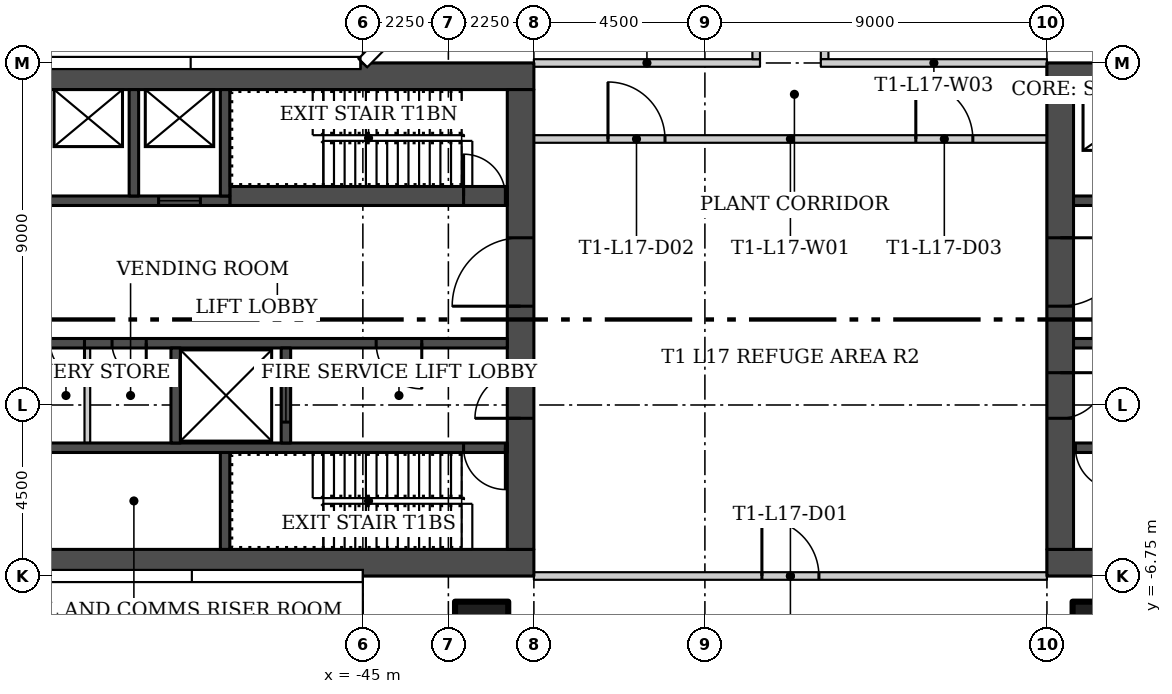
"""IFC4 building model, lengths in metres.
Left out: names, types, materials, properties, quantities, classifications, styles, units other than length and angle.
Written with IfcOpenShell. Run it as: python <this file> out.ifc"""

import sys

from ifc_helpers import new_model, si_unit, direction, frame, frame_2d, origin, origin_2d, place, context, subcontext, project, spatial, rectangle, hollow_rectangle, extrude, element, fill, save


model = new_model("IFC4")
c1 = context("Model", 3, precision=1e-05, world=origin(), true_north=direction((0.0, 1.0)))
c2 = subcontext(c1, "Body", "Model", "MODEL_VIEW")
j1 = project(units=[si_unit("LENGTHUNIT", "METRE"), si_unit("PLANEANGLEUNIT", "RADIAN")], contexts=[c1])
p1 = place(None, origin())
s1 = spatial("IfcSite", under=j1, at=p1, CompositionType="ELEMENT")
p2 = place(p1, origin())
s2 = spatial("IfcBuilding", under=s1, at=p2, CompositionType="ELEMENT")
p3 = place(p2, frame((0.0, 0.0, 77.1)))
s3 = spatial("IfcBuildingStorey", under=s2, at=p3, CompositionType="ELEMENT", Elevation=77.1)
for number, where in (
    (1, (-25.625, -8.125, 0.0)),
    (2, (-41.875, -8.125, 0.0)),
):
    element("IfcColumn", number, at=place(p3, frame(where)), inside=s3, PredefinedType="COLUMN", context=c2, shape_type="SweptSolid", body=[
        extrude(hollow_rectangle(XDim=1.4, YDim=1.4, WallThickness=0.05, at=origin_2d()), origin(), (0.0, 0.0, 1.0), 4.45),
    ])
p4 = place(p3, frame((-40.5, 4.75, 0.0)))
e3 = element("IfcWall", 3, at=p4, inside=s3, PredefinedType="PARTITIONING", context=c2, shape_type="SweptSolid", body=[
    extrude(rectangle(XDim=13.5, YDim=0.2, at=frame_2d((6.75, 0.0))), origin(), (0.0, 0.0, 1.0), 4.45),
])
p5 = place(p4, frame((1.95, 0.0, 0.0)))
e4 = element("IfcOpeningElement", 4, at=p5, cuts=e3, PredefinedType="OPENING", context=c2, shape_type="SweptSolid", body=[
    extrude(rectangle(XDim=1.5, YDim=2.4, at=frame_2d((0.75, 1.2))), frame((0.0, 0.11, 0.0), z_axis=(0.0, -1.0, 0.0), x_axis=(1.0, 0.0, 0.0)), (0.0, 0.0, 1.0), 0.22),
])
p6 = place(p4, frame((10.05, 0.0, 0.0)))
e5 = element("IfcOpeningElement", 5, at=p6, cuts=e3, PredefinedType="OPENING", context=c2, shape_type="SweptSolid", body=[
    extrude(rectangle(XDim=1.5, YDim=2.4, at=frame_2d((0.75, 1.2))), frame((0.0, 0.11, 0.0), z_axis=(0.0, -1.0, 0.0), x_axis=(1.0, 0.0, 0.0)), (0.0, 0.0, 1.0), 0.22),
])
p7 = place(p3, frame((-32.85, 15.65, 0.0), z_axis=(0.0, 0.0, 1.0), x_axis=(0.0, -1.0, 0.0)))
e6 = element("IfcWall", 6, at=p7, inside=s3, PredefinedType="PARTITIONING", context=c2, shape_type="SweptSolid", body=[
    extrude(rectangle(XDim=8.8, YDim=0.2, at=frame_2d((4.4, 0.0))), origin(), (0.0, 0.0, 1.0), 4.45),
])
p8 = place(p7, frame((3.65, 0.0, 0.0)))
e7 = element("IfcOpeningElement", 7, at=p8, cuts=e6, PredefinedType="OPENING", context=c2, shape_type="SweptSolid", body=[
    extrude(rectangle(XDim=1.5, YDim=2.4, at=frame_2d((0.75, 1.2))), frame((0.0, 0.11, 0.0), z_axis=(0.0, -1.0, 0.0), x_axis=(1.0, 0.0, 0.0)), (0.0, 0.0, 1.0), 0.22),
])
for number, where in (
    (8, (-32.95, 6.75, 0.0)),
    (9, (-40.5, 6.75, 0.0)),
):
    element("IfcWall", number, at=place(p3, frame(where)), inside=s3, PredefinedType="PARTITIONING", context=c2, shape_type="SweptSolid", body=[
        extrude(rectangle(XDim=5.95, YDim=0.2, at=frame_2d((2.975, 0.0))), origin(), (0.0, 0.0, 1.0), 4.45),
    ])
p9 = place(p3, frame((-34.65, 6.85, 0.0), z_axis=(0.0, 0.0, 1.0), x_axis=(0.0, 1.0, 0.0)))
e10 = element("IfcWall", 10, at=p9, inside=s3, PredefinedType="PARTITIONING", context=c2, shape_type="SweptSolid", body=[
    extrude(rectangle(XDim=8.8, YDim=0.2, at=frame_2d((4.4, 0.0))), origin(), (0.0, 0.0, 1.0), 4.45),
])
p10 = place(p9, frame((3.95, 0.0, 0.0)))
e11 = element("IfcOpeningElement", 11, at=p10, cuts=e10, PredefinedType="OPENING", context=c2, shape_type="SweptSolid", body=[
    extrude(rectangle(XDim=0.9, YDim=2.1, at=frame_2d((0.45, 1.05))), frame((0.0, 0.11, 0.0), z_axis=(0.0, -1.0, 0.0), x_axis=(1.0, 0.0, 0.0)), (0.0, 0.0, 1.0), 0.22),
])
p11 = place(p3, frame((-40.5, -6.75, 0.0)))
e12 = element("IfcWall", 12, at=p11, inside=s3, PredefinedType="PARTITIONING", context=c2, shape_type="SweptSolid", body=[
    extrude(rectangle(XDim=13.5, YDim=0.2, at=frame_2d((6.75, 0.0))), origin(), (0.0, 0.0, 1.0), 4.45),
])
p12 = place(p11, frame((6.0, 0.0, 0.0)))
e13 = element("IfcOpeningElement", 13, at=p12, cuts=e12, PredefinedType="OPENING", context=c2, shape_type="SweptSolid", body=[
    extrude(rectangle(XDim=1.5, YDim=2.4, at=frame_2d((0.75, 1.2))), frame((0.0, 0.11, 0.0), z_axis=(0.0, -1.0, 0.0), x_axis=(1.0, 0.0, 0.0)), (0.0, 0.0, 1.0), 0.22),
])
for number, where in (
    (14, (-27.0, -6.4, 0.0)),
    (15, (-27.0, 6.4, 0.0)),
):
    element("IfcWall", number, at=place(p3, frame(where)), inside=s3, PredefinedType="SHEAR", context=c2, shape_type="SweptSolid", body=[
        extrude(rectangle(XDim=13.5, YDim=0.7, at=frame_2d((6.75, 0.0))), origin(), (0.0, 0.0, 1.0), 4.45),
    ])
p13 = place(p3, frame((-26.65, 6.05, 0.0), z_axis=(0.0, 0.0, 1.0), x_axis=(0.0, -1.0, 0.0)))
e16 = element("IfcWall", 16, at=p13, inside=s3, PredefinedType="SHEAR", context=c2, shape_type="SweptSolid", body=[
    extrude(rectangle(XDim=12.1, YDim=0.7, at=frame_2d((6.05, 0.0))), origin(), (0.0, 0.0, 1.0), 4.45),
])
p14 = place(p13, frame((7.45, 0.0, 0.0)))
e17 = element("IfcOpeningElement", 17, at=p14, cuts=e16, PredefinedType="OPENING", context=c2, shape_type="SweptSolid", body=[
    extrude(rectangle(XDim=1.2, YDim=2.1, at=frame_2d((0.6, 1.05))), frame((0.0, 0.36, 0.0), z_axis=(0.0, -1.0, 0.0), x_axis=(1.0, 0.0, 0.0)), (0.0, 0.0, 1.0), 0.72),
])
p15 = place(p13, frame((3.9, 0.0, 0.0)))
e18 = element("IfcOpeningElement", 18, at=p15, cuts=e16, PredefinedType="OPENING", context=c2, shape_type="SweptSolid", body=[
    extrude(rectangle(XDim=1.8, YDim=2.4, at=frame_2d((0.9, 1.2))), frame((0.0, 0.36, 0.0), z_axis=(0.0, -1.0, 0.0), x_axis=(1.0, 0.0, 0.0)), (0.0, 0.0, 1.0), 0.72),
])
p16 = place(p3, frame((-14.2, -3.375, 0.0), z_axis=(0.0, 0.0, 1.0), x_axis=(-1.0, 0.0, 0.0)))
e19 = element("IfcWall", 19, at=p16, inside=s3, PredefinedType="SHEAR", context=c2, shape_type="SweptSolid", body=[
    extrude(rectangle(XDim=12.1, YDim=0.25, at=frame_2d((6.05, 0.0))), origin(), (0.0, 0.0, 1.0), 4.45),
])
p17 = place(p16, frame((10.95, 0.0, 0.0)))
e20 = element("IfcOpeningElement", 20, at=p17, cuts=e19, PredefinedType="OPENING", context=c2, shape_type="SweptSolid", body=[
    extrude(rectangle(XDim=1.1, YDim=2.1, at=frame_2d((0.55, 1.05))), frame((0.0, 0.135, 0.0), z_axis=(0.0, -1.0, 0.0), x_axis=(1.0, 0.0, 0.0)), (0.0, 0.0, 1.0), 0.27),
])
p18 = place(p3, frame((-14.2, -0.625, 0.0), z_axis=(0.0, 0.0, 1.0), x_axis=(-1.0, 0.0, 0.0)))
e21 = element("IfcWall", 21, at=p18, inside=s3, PredefinedType="SHEAR", context=c2, shape_type="SweptSolid", body=[
    extrude(rectangle(XDim=12.1, YDim=0.25, at=frame_2d((6.05, 0.0))), origin(), (0.0, 0.0, 1.0), 4.45),
])
p19 = place(p18, frame((8.65, 0.0, 0.0)))
e22 = element("IfcOpeningElement", 22, at=p19, cuts=e21, PredefinedType="OPENING", context=c2, shape_type="SweptSolid", body=[
    extrude(rectangle(XDim=1.2, YDim=2.1, at=frame_2d((0.6, 1.05))), frame((0.0, 0.135, 0.0), z_axis=(0.0, -1.0, 0.0), x_axis=(1.0, 0.0, 0.0)), (0.0, 0.0, 1.0), 0.27),
])
p20 = place(p18, frame((1.175, 0.0, 0.0)))
e23 = element("IfcOpeningElement", 23, at=p20, cuts=e21, PredefinedType="OPENING", context=c2, shape_type="SweptSolid", body=[
    extrude(rectangle(XDim=0.9, YDim=2.1, at=frame_2d((0.45, 1.05))), frame((0.0, 0.135, 0.0), z_axis=(0.0, -1.0, 0.0), x_axis=(1.0, 0.0, 0.0)), (0.0, 0.0, 1.0), 0.27),
])
p21 = place(p3, frame((-26.3, 3.125, 0.0)))
e24 = element("IfcWall", 24, at=p21, inside=s3, PredefinedType="SHEAR", context=c2, shape_type="SweptSolid", body=[
    extrude(rectangle(XDim=12.1, YDim=0.25, at=frame_2d((6.05, 0.0))), origin(), (0.0, 0.0, 1.0), 4.45),
])
p22 = place(p21, frame((0.85, 0.0, 0.0)))
e25 = element("IfcOpeningElement", 25, at=p22, cuts=e24, PredefinedType="OPENING", context=c2, shape_type="SweptSolid", body=[
    extrude(rectangle(XDim=1.1, YDim=2.1, at=frame_2d((0.55, 1.05))), frame((0.0, 0.135, 0.0), z_axis=(0.0, -1.0, 0.0), x_axis=(1.0, 0.0, 0.0)), (0.0, 0.0, 1.0), 0.27),
])
p23 = place(p21, frame((3.9, 0.0, 0.0)))
e26 = element("IfcOpeningElement", 26, at=p23, cuts=e24, PredefinedType="OPENING", context=c2, shape_type="SweptSolid", body=[
    extrude(rectangle(XDim=1.1, YDim=2.1, at=frame_2d((0.55, 1.05))), frame((0.0, 0.135, 0.0), z_axis=(0.0, -1.0, 0.0), x_axis=(1.0, 0.0, 0.0)), (0.0, 0.0, 1.0), 0.27),
])
for number, where, z_axis, x_axis in (
    (27, (-40.5, -6.4, 0.0), (0.0, 0.0, 1.0), (-1.0, 0.0, 0.0)),
    (28, (-40.5, 6.4, 0.0), (0.0, 0.0, 1.0), (-1.0, 0.0, 0.0)),
):
    element("IfcWall", number, at=place(p3, frame(where, z_axis=z_axis, x_axis=x_axis)), inside=s3, PredefinedType="SHEAR", context=c2, shape_type="SweptSolid", body=[
        extrude(rectangle(XDim=13.5, YDim=0.7, at=frame_2d((6.75, 0.0))), origin(), (0.0, 0.0, 1.0), 4.45),
    ])
p24 = place(p3, frame((-40.85, -6.05, 0.0), z_axis=(0.0, 0.0, 1.0), x_axis=(0.0, 1.0, 0.0)))
e29 = element("IfcWall", 29, at=p24, inside=s3, PredefinedType="SHEAR", context=c2, shape_type="SweptSolid", body=[
    extrude(rectangle(XDim=12.1, YDim=0.7, at=frame_2d((6.05, 0.0))), origin(), (0.0, 0.0, 1.0), 4.45),
])
p25 = place(p24, frame((3.45, 0.0, 0.0)))
e30 = element("IfcOpeningElement", 30, at=p25, cuts=e29, PredefinedType="OPENING", context=c2, shape_type="SweptSolid", body=[
    extrude(rectangle(XDim=1.2, YDim=2.1, at=frame_2d((0.6, 1.05))), frame((0.0, 0.36, 0.0), z_axis=(0.0, -1.0, 0.0), x_axis=(1.0, 0.0, 0.0)), (0.0, 0.0, 1.0), 0.72),
])
p26 = place(p24, frame((6.4, 0.0, 0.0)))
e31 = element("IfcOpeningElement", 31, at=p26, cuts=e29, PredefinedType="OPENING", context=c2, shape_type="SweptSolid", body=[
    extrude(rectangle(XDim=1.8, YDim=2.4, at=frame_2d((0.9, 1.2))), frame((0.0, 0.36, 0.0), z_axis=(0.0, -1.0, 0.0), x_axis=(1.0, 0.0, 0.0)), (0.0, 0.0, 1.0), 0.72),
])
p27 = place(p3, frame((-41.2, -3.375, 0.0), z_axis=(0.0, 0.0, 1.0), x_axis=(-1.0, 0.0, 0.0)))
e32 = element("IfcWall", 32, at=p27, inside=s3, PredefinedType="SHEAR", context=c2, shape_type="SweptSolid", body=[
    extrude(rectangle(XDim=12.1, YDim=0.25, at=frame_2d((6.05, 0.0))), origin(), (0.0, 0.0, 1.0), 4.45),
])
p28 = place(p27, frame((0.05, 0.0, 0.0)))
e33 = element("IfcOpeningElement", 33, at=p28, cuts=e32, PredefinedType="OPENING", context=c2, shape_type="SweptSolid", body=[
    extrude(rectangle(XDim=1.1, YDim=2.1, at=frame_2d((0.55, 1.05))), frame((0.0, 0.135, 0.0), z_axis=(0.0, -1.0, 0.0), x_axis=(1.0, 0.0, 0.0)), (0.0, 0.0, 1.0), 0.27),
])
p29 = place(p3, frame((-48.625, -6.05, 0.0), z_axis=(0.0, 0.0, 1.0), x_axis=(0.0, 1.0, 0.0)))
e34 = element("IfcWall", 34, at=p29, inside=s3, PredefinedType="SHEAR", context=c2, shape_type="SweptSolid", body=[
    extrude(rectangle(XDim=2.55, YDim=0.25, at=frame_2d((1.275, 0.0))), origin(), (0.0, 0.0, 1.0), 4.45),
])
p30 = place(p3, frame((-41.2, -0.625, 0.0), z_axis=(0.0, 0.0, 1.0), x_axis=(-1.0, 0.0, 0.0)))
e35 = element("IfcWall", 35, at=p30, inside=s3, PredefinedType="SHEAR", context=c2, shape_type="SweptSolid", body=[
    extrude(rectangle(XDim=12.1, YDim=0.25, at=frame_2d((6.05, 0.0))), origin(), (0.0, 0.0, 1.0), 4.45),
])
p31 = place(p30, frame((2.25, 0.0, 0.0)))
e36 = element("IfcOpeningElement", 36, at=p31, cuts=e35, PredefinedType="OPENING", context=c2, shape_type="SweptSolid", body=[
    extrude(rectangle(XDim=1.2, YDim=2.1, at=frame_2d((0.6, 1.05))), frame((0.0, 0.135, 0.0), z_axis=(0.0, -1.0, 0.0), x_axis=(1.0, 0.0, 0.0)), (0.0, 0.0, 1.0), 0.27),
])
p32 = place(p30, frame((9.5, 0.0, 0.0)))
e37 = element("IfcOpeningElement", 37, at=p32, cuts=e35, PredefinedType="OPENING", context=c2, shape_type="SweptSolid", body=[
    extrude(rectangle(XDim=0.9, YDim=2.1, at=frame_2d((0.45, 1.05))), frame((0.0, 0.135, 0.0), z_axis=(0.0, -1.0, 0.0), x_axis=(1.0, 0.0, 0.0)), (0.0, 0.0, 1.0), 0.27),
])
p33 = place(p30, frame((11.125, 0.0, 0.0)))
e38 = element("IfcOpeningElement", 38, at=p33, cuts=e35, PredefinedType="OPENING", context=c2, shape_type="SweptSolid", body=[
    extrude(rectangle(XDim=0.9, YDim=2.1, at=frame_2d((0.45, 1.05))), frame((0.0, 0.135, 0.0), z_axis=(0.0, -1.0, 0.0), x_axis=(1.0, 0.0, 0.0)), (0.0, 0.0, 1.0), 0.27),
])
p34 = place(p3, frame((-47.025, -3.25, 0.0), z_axis=(0.0, 0.0, 1.0), x_axis=(0.0, 1.0, 0.0)))
e39 = element("IfcWall", 39, at=p34, inside=s3, PredefinedType="SHEAR", context=c2, shape_type="SweptSolid", body=[
    extrude(rectangle(XDim=2.5, YDim=0.25, at=frame_2d((1.25, 0.0))), origin(), (0.0, 0.0, 1.0), 4.45),
])
p35 = place(p34, frame((0.55, 0.0, 0.0)))
e40 = element("IfcOpeningElement", 40, at=p35, cuts=e39, PredefinedType="OPENING", context=c2, shape_type="SweptSolid", body=[
    extrude(rectangle(XDim=1.4, YDim=2.4, at=frame_2d((0.7, 1.2))), frame((0.0, 0.135, 0.0), z_axis=(0.0, -1.0, 0.0), x_axis=(1.0, 0.0, 0.0)), (0.0, 0.0, 1.0), 0.27),
])
p36 = place(p3, frame((-49.925, -3.25, 0.0), z_axis=(0.0, 0.0, 1.0), x_axis=(0.0, 1.0, 0.0)))
e41 = element("IfcWall", 41, at=p36, inside=s3, PredefinedType="SHEAR", context=c2, shape_type="SweptSolid", body=[
    extrude(rectangle(XDim=2.5, YDim=0.25, at=frame_2d((1.25, 0.0))), origin(), (0.0, 0.0, 1.0), 4.45),
])
p37 = place(p3, frame((-52.25, -3.25, 0.0), z_axis=(0.0, 0.0, 1.0), x_axis=(0.0, 1.0, 0.0)))
e42 = element("IfcWall", 42, at=p37, inside=s3, PredefinedType="PARTITIONING", context=c2, shape_type="SweptSolid", body=[
    extrude(rectangle(XDim=2.5, YDim=0.15, at=frame_2d((1.25, 0.0))), origin(), (0.0, 0.0, 1.0), 4.45),
])
p38 = place(p3, frame((-48.5, 3.25, 0.0)))
e43 = element("IfcWall", 43, at=p38, inside=s3, PredefinedType="SHEAR", context=c2, shape_type="SweptSolid", body=[
    extrude(rectangle(XDim=7.3, YDim=0.5, at=frame_2d((3.65, 0.0))), origin(), (0.0, 0.0, 1.0), 4.45),
])
p39 = place(p38, frame((6.15, 0.0, 0.0)))
e44 = element("IfcOpeningElement", 44, at=p39, cuts=e43, PredefinedType="OPENING", context=c2, shape_type="SweptSolid", body=[
    extrude(rectangle(XDim=1.1, YDim=2.1, at=frame_2d((0.55, 1.05))), frame((0.0, 0.26, 0.0), z_axis=(0.0, -1.0, 0.0), x_axis=(1.0, 0.0, 0.0)), (0.0, 0.0, 1.0), 0.52),
])
p40 = place(p3, frame((-48.5, 3.125, 0.0), z_axis=(0.0, 0.0, 1.0), x_axis=(-1.0, 0.0, 0.0)))
e45 = element("IfcWall", 45, at=p40, inside=s3, PredefinedType="SHEAR", context=c2, shape_type="SweptSolid", body=[
    extrude(rectangle(XDim=4.8, YDim=0.25, at=frame_2d((2.4, 0.0))), origin(), (0.0, 0.0, 1.0), 4.45),
])
p41 = place(p40, frame((0.775, 0.0, 0.0)))
e46 = element("IfcOpeningElement", 46, at=p41, cuts=e45, PredefinedType="OPENING", context=c2, shape_type="SweptSolid", body=[
    extrude(rectangle(XDim=1.1, YDim=2.1, at=frame_2d((0.55, 1.05))), frame((0.0, 0.135, 0.0), z_axis=(0.0, -1.0, 0.0), x_axis=(1.0, 0.0, 0.0)), (0.0, 0.0, 1.0), 0.27),
])
for number, where, z_axis, x_axis in (
    (47, (-48.625, 3.25, 0.0), (0.0, 0.0, 1.0), (0.0, 1.0, 0.0)),
    (48, (-51.025, 3.25, 0.0), (0.0, 0.0, 1.0), (0.0, 1.0, 0.0)),
):
    element("IfcWall", number, at=place(p3, frame(where, z_axis=z_axis, x_axis=x_axis)), inside=s3, PredefinedType="SHEAR", context=c2, shape_type="SweptSolid", body=[
        extrude(rectangle(XDim=2.8, YDim=0.25, at=frame_2d((1.4, 0.0))), origin(), (0.0, 0.0, 1.0), 4.45),
    ])
p42 = place(p12, origin())
e49 = element("IfcDoor", 49, at=p42, inside=s3, OperationType="DOUBLE_DOOR_SINGLE_SWING", PredefinedType="DOOR", context=c2, shape_type="SweptSolid", body=[
    extrude(rectangle(XDim=1.5, YDim=2.4, at=frame_2d((0.75, 1.2))), frame((0.0, 0.025, 0.0), z_axis=(0.0, -1.0, 0.0), x_axis=(1.0, 0.0, 0.0)), (0.0, 0.0, 1.0), 0.05),
])
fill(e13, e49)
p43 = place(p5, origin())
e50 = element("IfcDoor", 50, at=p43, inside=s3, OperationType="DOUBLE_DOOR_SINGLE_SWING", PredefinedType="DOOR", context=c2, shape_type="SweptSolid", body=[
    extrude(rectangle(XDim=1.5, YDim=2.4, at=frame_2d((0.75, 1.2))), frame((0.0, 0.025, 0.0), z_axis=(0.0, -1.0, 0.0), x_axis=(1.0, 0.0, 0.0)), (0.0, 0.0, 1.0), 0.05),
])
fill(e4, e50)
p44 = place(p6, origin())
e51 = element("IfcDoor", 51, at=p44, inside=s3, OperationType="DOUBLE_DOOR_SINGLE_SWING", PredefinedType="DOOR", context=c2, shape_type="SweptSolid", body=[
    extrude(rectangle(XDim=1.5, YDim=2.4, at=frame_2d((0.75, 1.2))), frame((0.0, 0.025, 0.0), z_axis=(0.0, -1.0, 0.0), x_axis=(1.0, 0.0, 0.0)), (0.0, 0.0, 1.0), 0.05),
])
fill(e5, e51)
p45 = place(p14, origin())
e52 = element("IfcDoor", 52, at=p45, inside=s3, OperationType="SINGLE_SWING_RIGHT", PredefinedType="DOOR", context=c2, shape_type="SweptSolid", body=[
    extrude(rectangle(XDim=1.2, YDim=2.1, at=frame_2d((0.6, 1.05))), frame((0.0, 0.025, 0.0), z_axis=(0.0, -1.0, 0.0), x_axis=(1.0, 0.0, 0.0)), (0.0, 0.0, 1.0), 0.05),
])
fill(e17, e52)
p46 = place(p15, origin())
e53 = element("IfcDoor", 53, at=p46, inside=s3, OperationType="DOUBLE_DOOR_SINGLE_SWING", PredefinedType="DOOR", context=c2, shape_type="SweptSolid", body=[
    extrude(rectangle(XDim=1.8, YDim=2.4, at=frame_2d((0.9, 1.2))), frame((0.0, 0.025, 0.0), z_axis=(0.0, -1.0, 0.0), x_axis=(1.0, 0.0, 0.0)), (0.0, 0.0, 1.0), 0.05),
])
fill(e18, e53)
p47 = place(p17, origin())
e54 = element("IfcDoor", 54, at=p47, inside=s3, OperationType="SINGLE_SWING_RIGHT", PredefinedType="DOOR", context=c2, shape_type="SweptSolid", body=[
    extrude(rectangle(XDim=1.1, YDim=2.1, at=frame_2d((0.55, 1.05))), frame((0.0, 0.025, 0.0), z_axis=(0.0, -1.0, 0.0), x_axis=(1.0, 0.0, 0.0)), (0.0, 0.0, 1.0), 0.05),
])
fill(e20, e54)
p48 = place(p25, origin())
e55 = element("IfcDoor", 55, at=p48, inside=s3, OperationType="SINGLE_SWING_LEFT", PredefinedType="DOOR", context=c2, shape_type="SweptSolid", body=[
    extrude(rectangle(XDim=1.2, YDim=2.1, at=frame_2d((0.6, 1.05))), frame((0.0, 0.025, 0.0), z_axis=(0.0, -1.0, 0.0), x_axis=(1.0, 0.0, 0.0)), (0.0, 0.0, 1.0), 0.05),
])
fill(e30, e55)
p49 = place(p26, origin())
e56 = element("IfcDoor", 56, at=p49, inside=s3, OperationType="DOUBLE_DOOR_SINGLE_SWING", PredefinedType="DOOR", context=c2, shape_type="SweptSolid", body=[
    extrude(rectangle(XDim=1.8, YDim=2.4, at=frame_2d((0.9, 1.2))), frame((0.0, 0.025, 0.0), z_axis=(0.0, -1.0, 0.0), x_axis=(1.0, 0.0, 0.0)), (0.0, 0.0, 1.0), 0.05),
])
fill(e31, e56)
p50 = place(p28, origin())
e57 = element("IfcDoor", 57, at=p50, inside=s3, OperationType="SINGLE_SWING_LEFT", PredefinedType="DOOR", context=c2, shape_type="SweptSolid", body=[
    extrude(rectangle(XDim=1.1, YDim=2.1, at=frame_2d((0.55, 1.05))), frame((0.0, 0.025, 0.0), z_axis=(0.0, -1.0, 0.0), x_axis=(1.0, 0.0, 0.0)), (0.0, 0.0, 1.0), 0.05),
])
fill(e33, e57)
p51 = place(p31, origin())
e58 = element("IfcDoor", 58, at=p51, inside=s3, OperationType="SINGLE_SWING_LEFT", PredefinedType="DOOR", context=c2, shape_type="SweptSolid", body=[
    extrude(rectangle(XDim=1.2, YDim=2.1, at=frame_2d((0.6, 1.05))), frame((0.0, 0.025, 0.0), z_axis=(0.0, -1.0, 0.0), x_axis=(1.0, 0.0, 0.0)), (0.0, 0.0, 1.0), 0.05),
])
fill(e36, e58)
p52 = place(p32, origin())
e59 = element("IfcDoor", 59, at=p52, inside=s3, OperationType="SINGLE_SWING_RIGHT", PredefinedType="DOOR", context=c2, shape_type="SweptSolid", body=[
    extrude(rectangle(XDim=0.9, YDim=2.1, at=frame_2d((0.45, 1.05))), frame((0.0, 0.025, 0.0), z_axis=(0.0, -1.0, 0.0), x_axis=(1.0, 0.0, 0.0)), (0.0, 0.0, 1.0), 0.05),
])
fill(e37, e59)
p53 = place(p33, origin())
e60 = element("IfcDoor", 60, at=p53, inside=s3, OperationType="SINGLE_SWING_RIGHT", PredefinedType="DOOR", context=c2, shape_type="SweptSolid", body=[
    extrude(rectangle(XDim=0.9, YDim=2.1, at=frame_2d((0.45, 1.05))), frame((0.0, 0.025, 0.0), z_axis=(0.0, -1.0, 0.0), x_axis=(1.0, 0.0, 0.0)), (0.0, 0.0, 1.0), 0.05),
])
fill(e38, e60)
p54 = place(p35, origin())
e61 = element("IfcDoor", 61, at=p54, inside=s3, OperationType="SLIDING_TO_LEFT", PredefinedType="DOOR", context=c2, shape_type="SweptSolid", body=[
    extrude(rectangle(XDim=1.4, YDim=2.4, at=frame_2d((0.7, 1.2))), frame((0.0, 0.025, 0.0), z_axis=(0.0, -1.0, 0.0), x_axis=(1.0, 0.0, 0.0)), (0.0, 0.0, 1.0), 0.05),
])
fill(e40, e61)
p55 = place(p39, origin())
e62 = element("IfcDoor", 62, at=p55, inside=s3, OperationType="SINGLE_SWING_RIGHT", PredefinedType="DOOR", context=c2, shape_type="SweptSolid", body=[
    extrude(rectangle(XDim=1.1, YDim=2.1, at=frame_2d((0.55, 1.05))), frame((0.0, 0.025, 0.0), z_axis=(0.0, -1.0, 0.0), x_axis=(1.0, 0.0, 0.0)), (0.0, 0.0, 1.0), 0.05),
])
fill(e44, e62)
p56 = place(p41, origin())
e63 = element("IfcDoor", 63, at=p56, inside=s3, OperationType="SLIDING_TO_LEFT", PredefinedType="DOOR", context=c2, shape_type="SweptSolid", body=[
    extrude(rectangle(XDim=1.1, YDim=2.1, at=frame_2d((0.55, 1.05))), frame((0.0, 0.025, 0.0), z_axis=(0.0, -1.0, 0.0), x_axis=(1.0, 0.0, 0.0)), (0.0, 0.0, 1.0), 0.05),
])
fill(e46, e63)
save(model, sys.argv[1])
